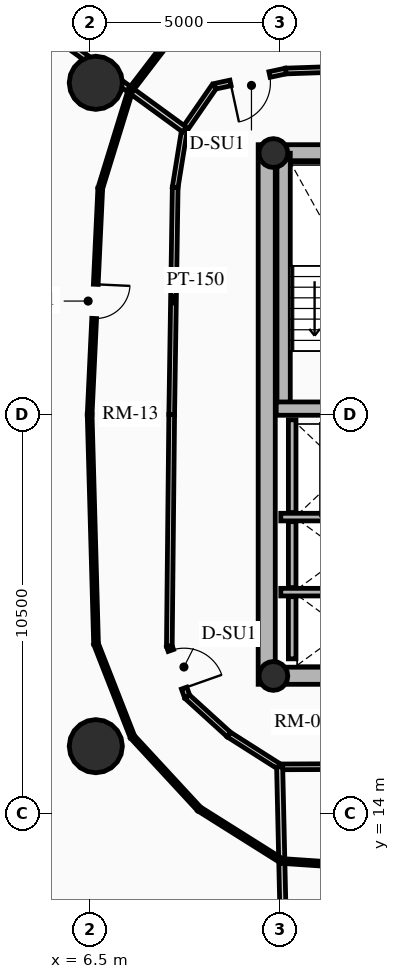
"""IFC4 building model, lengths in metres.
Left out: names, types, materials, properties, quantities, classifications, styles, units other than length and angle.
Written with IfcOpenShell. Run it as: python <this file> out.ifc"""

import sys

from ifc_helpers import new_model, si_unit, direction, frame, frame_2d, origin, origin_2d, place, context, subcontext, project, spatial, rectangle, circle, hollow_circle, extrude, source, transform, mapped, element, fill, save


model = new_model("IFC4")
c1 = context("Model", 3, precision=1e-05, world=origin(), true_north=direction((0.0, 1.0)))
c2 = subcontext(c1, "Body", "Model", "MODEL_VIEW")
j1 = project(units=[si_unit("LENGTHUNIT", "METRE"), si_unit("PLANEANGLEUNIT", "RADIAN")], contexts=[c1])
p1 = place(None, origin())
s1 = spatial("IfcSite", under=j1, at=p1, CompositionType="ELEMENT")
p2 = place(p1, origin())
s2 = spatial("IfcBuilding", under=s1, at=p2, CompositionType="ELEMENT")
p3 = place(p2, frame((0.0, 0.0, 87.61)))
s3 = spatial("IfcBuildingStorey", under=s2, at=p3, CompositionType="ELEMENT", Elevation=87.61)
p4 = place(p3, frame((11.15, 17.4, 0.0), z_axis=(0.0, 0.0, 1.0), x_axis=(0.0, 1.0, 0.0)))
e1 = element("IfcWall", 1, at=p4, inside=s3, PredefinedType="SHEAR", context=c2, shape_type="SweptSolid", body=[
    extrude(rectangle(XDim=14.2, YDim=0.45, at=frame_2d((7.1, 0.0))), origin(), (0.0, 0.0, 1.0), 2.91),
])
p5 = place(p3, frame((11.15, 17.625, 0.0), z_axis=(0.0, 0.0, 1.0), x_axis=(1.0, 0.0, 0.0)))
e2 = element("IfcWall", 2, at=p5, inside=s3, PredefinedType="SHEAR", context=c2, shape_type="SweptSolid", body=[
    extrude(rectangle(XDim=10.7, YDim=0.45, at=frame_2d((5.35, 0.0))), origin(), (0.0, 0.0, 1.0), 2.91),
])
m1 = source(origin(), c2, "Body", "SweptSolid", [
    extrude(rectangle(XDim=1.5, YDim=2.02, at=frame_2d((0.75, 1.01))), frame((0.0, 0.235, 0.0), z_axis=(0.0, -1.0, 0.0), x_axis=(1.0, 0.0, 0.0)), (0.0, 0.0, 1.0), 0.47),
])
p6 = place(p5, frame((5.45, 0.0, 0.0)))
e3 = element("IfcOpeningElement", 3, at=p6, cuts=e2, PredefinedType="OPENING", context=c2, shape_type="MappedRepresentation", body=[
    mapped(m1, transform((0.0, 0.0, 0.0), x_axis=(1.0, 0.0, 0.0), y_axis=(0.0, 1.0, 0.0), z_axis=(0.0, 0.0, 1.0), scale=1.0)),
])
p7 = place(p3, frame((11.15, 31.375, 0.0), z_axis=(0.0, 0.0, 1.0), x_axis=(1.0, 0.0, 0.0)))
e4 = element("IfcWall", 4, at=p7, inside=s3, PredefinedType="SHEAR", context=c2, shape_type="SweptSolid", body=[
    extrude(rectangle(XDim=10.7, YDim=0.45, at=frame_2d((5.35, 0.0))), origin(), (0.0, 0.0, 1.0), 2.91),
])
p8 = place(p7, frame((4.6, 0.0, 0.0)))
e5 = element("IfcOpeningElement", 5, at=p8, cuts=e4, PredefinedType="OPENING", context=c2, shape_type="MappedRepresentation", body=[
    mapped(m1, transform((0.0, 0.0, 0.0), x_axis=(1.0, 0.0, 0.0), y_axis=(0.0, 1.0, 0.0), z_axis=(0.0, 0.0, 1.0), scale=1.0)),
])
p9 = place(p3, frame((11.595, 24.655, 0.0), z_axis=(0.0, 0.0, 1.0), x_axis=(0.0, 1.0, 0.0)))
e6 = element("IfcWall", 6, at=p9, inside=s3, PredefinedType="SHEAR", context=c2, shape_type="SweptSolid", body=[
    extrude(rectangle(XDim=6.72, YDim=0.35, at=frame_2d((3.36, 0.0))), origin(), (0.0, 0.0, 1.0), 2.91),
])
p10 = place(p3, frame((11.4, 24.655, 0.0), z_axis=(0.0, 0.0, 1.0), x_axis=(1.0, 0.0, 0.0)))
e7 = element("IfcWall", 7, at=p10, inside=s3, PredefinedType="SHEAR", context=c2, shape_type="SweptSolid", body=[
    extrude(rectangle(XDim=3.285, YDim=0.35, at=frame_2d((1.643, 0.0))), origin(), (0.0, 0.0, 1.0), 2.91),
])
for number, where, z_axis, x_axis in (
    (8, (11.325, 17.62, 0.0), (0.0, 0.0, 1.0), (1.0, 0.0, 0.0)),
    (9, (11.325, 31.38, 0.0), (0.0, 0.0, 1.0), (1.0, 0.0, 0.0)),
):
    element("IfcColumn", number, at=place(p3, frame(where, z_axis=z_axis, x_axis=x_axis)), inside=s3, PredefinedType="COLUMN", context=c2, shape_type="SweptSolid", body=[
        extrude(hollow_circle(Radius=0.38, WallThickness=0.032, at=origin_2d()), origin(), (0.0, 0.0, 1.0), 2.91),
    ])
for number, where, z_axis, x_axis in (
    (10, (6.653, 33.229, 0.0), (0.0, 0.0, 1.0), (1.0, 0.0, 0.0)),
    (11, (6.653, 15.771, 0.0), (0.0, 0.0, 1.0), (1.0, 0.0, 0.0)),
):
    element("IfcColumn", number, at=place(p3, frame(where, z_axis=z_axis, x_axis=x_axis)), inside=s3, PredefinedType="USERDEFINED", context=c2, shape_type="SweptSolid", body=[
        extrude(circle(Radius=0.7, at=origin_2d()), origin(), (0.0, 0.0, 1.0), 2.91),
    ])
p11 = place(p3, frame((7.342, 9.072, 0.0), z_axis=(0.0, 0.0, 1.0), x_axis=(-0.632700781152, 0.77439635945, 0.0)))
e12 = element("IfcWall", 12, at=p11, inside=s3, PredefinedType="SOLIDWALL", context=c2, shape_type="SweptSolid", body=[
    extrude(rectangle(XDim=5.448, YDim=0.24, at=frame_2d((2.724, 0.0))), origin(), (0.0, 0.0, 1.0), 2.179),
])
p12 = place(p3, frame((11.52, 21.8, 0.0), z_axis=(0.0, 0.0, 1.0), x_axis=(1.0, 0.0, 0.0)))
e13 = element("IfcWall", 13, at=p12, inside=s3, PredefinedType="SHEAR", context=c2, shape_type="SweptSolid", body=[
    extrude(rectangle(XDim=2.97, YDim=0.2, at=frame_2d((1.485, 0.0))), origin(), (0.0, 0.0, 1.0), 2.91),
])
p13 = place(p3, frame((11.82, 21.92, 0.0), z_axis=(0.0, 0.0, 1.0), x_axis=(0.0, 1.0, 0.0)))
e14 = element("IfcWall", 14, at=p13, inside=s3, PredefinedType="SHEAR", context=c2, shape_type="SweptSolid", body=[
    extrude(rectangle(XDim=2.44, YDim=0.2, at=frame_2d((1.22, 0.0))), origin(), (0.0, 0.0, 1.0), 2.91),
])
p14 = place(p3, frame((11.52, 19.825, 0.0), z_axis=(0.0, 0.0, 1.0), x_axis=(1.0, 0.0, 0.0)))
e15 = element("IfcWall", 15, at=p14, inside=s3, PredefinedType="SHEAR", context=c2, shape_type="SweptSolid", body=[
    extrude(rectangle(XDim=2.97, YDim=0.2, at=frame_2d((1.485, 0.0))), origin(), (0.0, 0.0, 1.0), 2.91),
])
p15 = place(p3, frame((11.82, 19.945, 0.0), z_axis=(0.0, 0.0, 1.0), x_axis=(0.0, 1.0, 0.0)))
e16 = element("IfcWall", 16, at=p15, inside=s3, PredefinedType="SHEAR", context=c2, shape_type="SweptSolid", body=[
    extrude(rectangle(XDim=1.735, YDim=0.2, at=frame_2d((0.867, 0.0))), origin(), (0.0, 0.0, 1.0), 2.91),
])
p16 = place(p3, frame((11.82, 18.07, 0.0), z_axis=(0.0, 0.0, 1.0), x_axis=(0.0, 1.0, 0.0)))
e17 = element("IfcWall", 17, at=p16, inside=s3, PredefinedType="SHEAR", context=c2, shape_type="SweptSolid", body=[
    extrude(rectangle(XDim=1.635, YDim=0.2, at=frame_2d((0.817, 0.0))), origin(), (0.0, 0.0, 1.0), 2.91),
])
p17 = place(p3, frame((18.133, 33.76, 0.0), z_axis=(0.0, 0.0, 1.0), x_axis=(-0.999419643988, -0.034064280574, 0.0)))
e18 = element("IfcWall", 18, at=p17, inside=s3, PredefinedType="PARTITIONING", context=c2, shape_type="SweptSolid", body=[
    extrude(rectangle(XDim=6.486, YDim=0.15, at=frame_2d((3.243, 0.0))), origin(), (0.0, 0.0, 1.0), 2.225),
])
p18 = place(p3, frame((11.65, 33.539, 0.0), z_axis=(0.0, 0.0, 1.0), x_axis=(-0.977535921581, -0.210768882949, 0.0)))
e19 = element("IfcWall", 19, at=p18, inside=s3, PredefinedType="PARTITIONING", context=c2, shape_type="SweptSolid", body=[
    extrude(rectangle(XDim=1.923, YDim=0.15, at=frame_2d((0.961, 0.0))), origin(), (0.0, 0.0, 1.0), 2.225),
])
m2 = source(origin(), c2, "Body", "SweptSolid", [
    extrude(rectangle(XDim=1.05, YDim=2.015, at=frame_2d((0.525, 1.007))), frame((0.0, 0.085, 0.0), z_axis=(0.0, -1.0, 0.0), x_axis=(1.0, 0.0, 0.0)), (0.0, 0.0, 1.0), 0.17),
])
p19 = place(p18, frame((0.436, 0.0, 0.0)))
e20 = element("IfcOpeningElement", 20, at=p19, cuts=e19, PredefinedType="OPENING", context=c2, shape_type="MappedRepresentation", body=[
    mapped(m2, transform((0.0, 0.0, 0.0), x_axis=(1.0, 0.0, 0.0), y_axis=(0.0, 1.0, 0.0), z_axis=(0.0, 0.0, 1.0), scale=1.0)),
])
p20 = place(p3, frame((9.771, 33.133, 0.0), z_axis=(0.0, 0.0, 1.0), x_axis=(-0.568464531016, -0.822707771312, 0.0)))
e21 = element("IfcWall", 21, at=p20, inside=s3, PredefinedType="PARTITIONING", context=c2, shape_type="SweptSolid", body=[
    extrude(rectangle(XDim=1.38, YDim=0.15, at=frame_2d((0.69, 0.0))), origin(), (0.0, 0.0, 1.0), 2.225),
])
p21 = place(p3, frame((8.986, 31.998, 0.0), z_axis=(0.0, 0.0, 1.0), x_axis=(-0.158992972351, -0.98727971454, 0.0)))
e22 = element("IfcWall", 22, at=p21, inside=s3, PredefinedType="PARTITIONING", context=c2, shape_type="SweptSolid", body=[
    extrude(rectangle(XDim=1.539, YDim=0.15, at=frame_2d((0.769, 0.0))), origin(), (0.0, 0.0, 1.0), 2.225),
])
p22 = place(p3, frame((8.742, 30.479, 0.0), z_axis=(0.0, 0.0, 1.0), x_axis=(-0.015351396174, -0.999882160375, 0.0)))
e23 = element("IfcWall", 23, at=p22, inside=s3, PredefinedType="PARTITIONING", context=c2, shape_type="SweptSolid", body=[
    extrude(rectangle(XDim=5.98, YDim=0.15, at=frame_2d((2.99, 0.0))), origin(), (0.0, 0.0, 1.0), 2.655),
])
p23 = place(p3, frame((8.65, 24.5, 0.0), z_axis=(0.0, 0.0, 1.0), x_axis=(-0.010250943023, -0.999947457703, 0.0)))
e24 = element("IfcWall", 24, at=p23, inside=s3, PredefinedType="PARTITIONING", context=c2, shape_type="SweptSolid", body=[
    extrude(rectangle(XDim=6.097, YDim=0.15, at=frame_2d((3.048, 0.0))), origin(), (0.0, 0.0, 1.0), 2.225),
])
p24 = place(p3, frame((8.587, 18.403, 0.0), z_axis=(0.0, 0.0, 1.0), x_axis=(0.333119120686, -0.942884749815, 0.0)))
e25 = element("IfcWall", 25, at=p24, inside=s3, PredefinedType="PARTITIONING", context=c2, shape_type="SweptSolid", body=[
    extrude(rectangle(XDim=1.409, YDim=0.15, at=frame_2d((0.705, 0.0))), origin(), (0.0, 0.0, 1.0), 2.225),
])
p25 = place(p24, frame((0.12, 0.0, 0.0)))
e26 = element("IfcOpeningElement", 26, at=p25, cuts=e25, PredefinedType="OPENING", context=c2, shape_type="MappedRepresentation", body=[
    mapped(m2, transform((0.0, 0.0, 0.0), x_axis=(1.0, 0.0, 0.0), y_axis=(0.0, 1.0, 0.0), z_axis=(0.0, 0.0, 1.0), scale=1.0)),
])
p26 = place(p3, frame((9.057, 17.074, 0.0), z_axis=(0.0, 0.0, 1.0), x_axis=(0.739999571423, -0.672607340351, 0.0)))
e27 = element("IfcWall", 27, at=p26, inside=s3, PredefinedType="PARTITIONING", context=c2, shape_type="SweptSolid", body=[
    extrude(rectangle(XDim=1.485, YDim=0.15, at=frame_2d((0.743, 0.0))), origin(), (0.0, 0.0, 1.0), 2.225),
])
p27 = place(p3, frame((10.156, 16.075, 0.0), z_axis=(0.0, 0.0, 1.0), x_axis=(0.843896624713, -0.536505812455, 0.0)))
e28 = element("IfcWall", 28, at=p27, inside=s3, PredefinedType="PARTITIONING", context=c2, shape_type="SweptSolid", body=[
    extrude(rectangle(XDim=1.581, YDim=0.15, at=frame_2d((0.791, 0.0))), origin(), (0.0, 0.0, 1.0), 2.225),
])
p28 = place(p3, frame((11.49, 15.227, 0.0), z_axis=(0.0, 0.0, 1.0), x_axis=(0.999991728046, 0.004067411998, 0.0)))
e29 = element("IfcWall", 29, at=p28, inside=s3, PredefinedType="PARTITIONING", context=c2, shape_type="SweptSolid", body=[
    extrude(rectangle(XDim=3.301, YDim=0.15, at=frame_2d((1.651, 0.0))), origin(), (0.0, 0.0, 1.0), 2.225),
])
p29 = place(p3, frame((8.986, 31.998, 0.0), z_axis=(0.0, 0.0, 1.0), x_axis=(-0.808130498411, 0.589003478375, 0.0)))
e30 = element("IfcWall", 30, at=p29, inside=s3, PredefinedType="PARTITIONING", context=c2, shape_type="SweptSolid", body=[
    extrude(rectangle(XDim=6.281, YDim=0.16, at=frame_2d((3.14, 0.0))), origin(), (0.0, 0.0, 1.0), 2.179),
])
p30 = place(p3, frame((11.49, 15.227, 0.0), z_axis=(0.0, 0.0, 1.0), x_axis=(0.022711375682, -0.999742063442, 0.0)))
e31 = element("IfcWall", 31, at=p30, inside=s3, PredefinedType="PARTITIONING", context=c2, shape_type="SweptSolid", body=[
    extrude(rectangle(XDim=8.847, YDim=0.16, at=frame_2d((4.423, 0.0))), origin(), (0.0, 0.0, 1.0), 2.179),
])
p31 = place(p3, frame((9.094, 35.031, 0.0), z_axis=(0.0, 0.0, 1.0), x_axis=(-0.607813927368, -0.794079485755, 0.0)))
e32 = element("IfcWall", 32, at=p31, inside=s3, PredefinedType="PARTITIONING", context=c2, shape_type="SweptSolid", body=[
    extrude(rectangle(XDim=2.515, YDim=0.125, at=frame_2d((1.258, 0.0))), origin(), (0.0, 0.0, 1.0), 2.655),
])
p32 = place(p3, frame((7.565, 33.034, 0.0), z_axis=(0.0, 0.0, 1.0), x_axis=(-0.294365365095, -0.955692958974, 0.0)))
e33 = element("IfcWall", 33, at=p32, inside=s3, PredefinedType="PARTITIONING", context=c2, shape_type="SweptSolid", body=[
    extrude(rectangle(XDim=2.7, YDim=0.125, at=frame_2d((1.35, 0.0))), origin(), (0.0, 0.0, 1.0), 2.225),
])
p33 = place(p3, frame((6.77, 30.453, 0.0), z_axis=(0.0, 0.0, 1.0), x_axis=(-0.046864461883, -0.998901257489, 0.0)))
e34 = element("IfcWall", 34, at=p33, inside=s3, PredefinedType="PARTITIONING", context=c2, shape_type="SweptSolid", body=[
    extrude(rectangle(XDim=5.96, YDim=0.125, at=frame_2d((2.98, 0.0))), origin(), (0.0, 0.0, 1.0), 2.655),
])
m3 = source(origin(), c2, "Body", "SweptSolid", [
    extrude(rectangle(XDim=0.9, YDim=2.005, at=frame_2d((0.45, 1.002))), frame((0.0, 0.073, 0.0), z_axis=(0.0, -1.0, 0.0), x_axis=(1.0, 0.0, 0.0)), (0.0, 0.0, 1.0), 0.145),
])
p34 = place(p33, frame((2.53, 0.0, 0.0)))
e35 = element("IfcOpeningElement", 35, at=p34, cuts=e34, PredefinedType="OPENING", context=c2, shape_type="MappedRepresentation", body=[
    mapped(m3, transform((0.0, 0.0, 0.0), x_axis=(1.0, 0.0, 0.0), y_axis=(0.0, 1.0, 0.0), z_axis=(0.0, 0.0, 1.0), scale=1.0)),
])
p35 = place(p3, frame((6.491, 24.5, 0.0), z_axis=(0.0, 0.0, 1.0), x_axis=(0.027808577393, -0.99961326673, 0.0)))
e36 = element("IfcWall", 36, at=p35, inside=s3, PredefinedType="PARTITIONING", context=c2, shape_type="SweptSolid", body=[
    extrude(rectangle(XDim=6.04, YDim=0.125, at=frame_2d((3.02, 0.0))), origin(), (0.0, 0.0, 1.0), 2.225),
])
p36 = place(p3, frame((6.659, 18.462, 0.0), z_axis=(0.0, 0.0, 1.0), x_axis=(0.364644852064, -0.931146675805, 0.0)))
e37 = element("IfcWall", 37, at=p36, inside=s3, PredefinedType="PARTITIONING", context=c2, shape_type="SweptSolid", body=[
    extrude(rectangle(XDim=2.625, YDim=0.125, at=frame_2d((1.312, 0.0))), origin(), (0.0, 0.0, 1.0), 2.225),
])
p37 = place(p3, frame((7.616, 16.018, 0.0), z_axis=(0.0, 0.0, 1.0), x_axis=(0.67871125453, -0.734405223956, 0.0)))
e38 = element("IfcWall", 38, at=p37, inside=s3, PredefinedType="PARTITIONING", context=c2, shape_type="SweptSolid", body=[
    extrude(rectangle(XDim=2.586, YDim=0.125, at=frame_2d((1.293, 0.0))), origin(), (0.0, 0.0, 1.0), 2.655),
])
p38 = place(p3, frame((9.371, 14.119, 0.0), z_axis=(0.0, 0.0, 1.0), x_axis=(0.846446940893, -0.532473075613, 0.0)))
e39 = element("IfcWall", 39, at=p38, inside=s3, PredefinedType="PARTITIONING", context=c2, shape_type="SweptSolid", body=[
    extrude(rectangle(XDim=2.57, YDim=0.125, at=frame_2d((1.285, 0.0))), origin(), (0.0, 0.0, 1.0), 2.225),
])
p39 = place(p3, frame((11.547, 12.75, 0.0), z_axis=(0.0, 0.0, 1.0), x_axis=(0.997731575096, -0.067317932645, 0.0)))
e40 = element("IfcWall", 40, at=p39, inside=s3, PredefinedType="PARTITIONING", context=c2, shape_type="SweptSolid", body=[
    extrude(rectangle(XDim=3.732, YDim=0.125, at=frame_2d((1.866, 0.0))), origin(), (0.0, 0.0, 1.0), 2.225),
])
m4 = source(origin(), c2, "Body", "SweptSolid", [
    extrude(rectangle(XDim=1.05, YDim=2.015, at=frame_2d((0.525, 1.007))), frame((0.0, 0.025, 0.0), z_axis=(0.0, -1.0, 0.0), x_axis=(1.0, 0.0, 0.0)), (0.0, 0.0, 1.0), 0.05),
])
p40 = place(p19, origin())
e41 = element("IfcDoor", 41, at=p40, inside=s3, OperationType="SINGLE_SWING_RIGHT", PredefinedType="DOOR", context=c2, shape_type="MappedRepresentation", body=[
    mapped(m4, transform((0.0, 0.0, 0.0), x_axis=(1.0, 0.0, 0.0), y_axis=(0.0, 1.0, 0.0), z_axis=(0.0, 0.0, 1.0), scale=1.0)),
])
fill(e20, e41)
p41 = place(p25, origin())
e42 = element("IfcDoor", 42, at=p41, inside=s3, OperationType="SINGLE_SWING_RIGHT", PredefinedType="DOOR", context=c2, shape_type="MappedRepresentation", body=[
    mapped(m4, transform((0.0, 0.0, 0.0), x_axis=(1.0, 0.0, 0.0), y_axis=(0.0, 1.0, 0.0), z_axis=(0.0, 0.0, 1.0), scale=1.0)),
])
fill(e26, e42)
m5 = source(origin(), c2, "Body", "SweptSolid", [
    extrude(rectangle(XDim=0.9, YDim=2.005, at=frame_2d((0.45, 1.002))), frame((0.0, 0.025, 0.0), z_axis=(0.0, -1.0, 0.0), x_axis=(1.0, 0.0, 0.0)), (0.0, 0.0, 1.0), 0.05),
])
p42 = place(p34, origin())
e43 = element("IfcDoor", 43, at=p42, inside=s3, OperationType="SINGLE_SWING_LEFT", PredefinedType="DOOR", context=c2, shape_type="MappedRepresentation", body=[
    mapped(m5, transform((0.0, 0.0, 0.0), x_axis=(1.0, 0.0, 0.0), y_axis=(0.0, 1.0, 0.0), z_axis=(0.0, 0.0, 1.0), scale=1.0)),
])
fill(e35, e43)
save(model, sys.argv[1])
